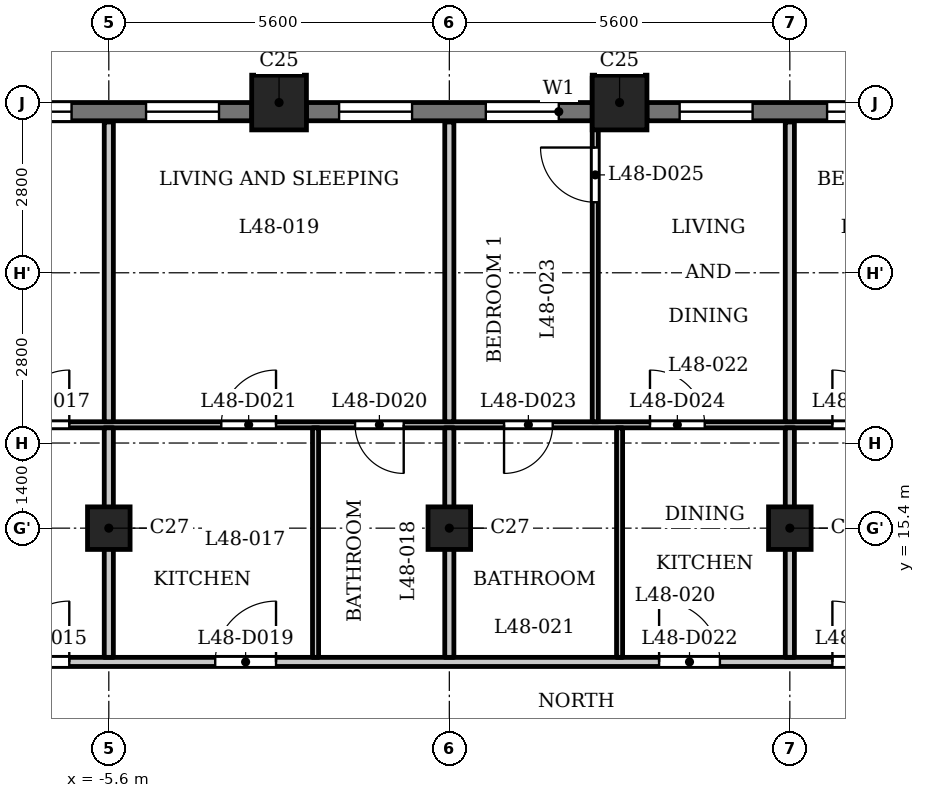
"""IFC4 building model, lengths in metres.
Left out: names, types, materials, properties, quantities, classifications, styles, units other than length and angle.
Written with IfcOpenShell. Run it as: python <this file> out.ifc"""

import sys

from ifc_helpers import new_model, si_unit, direction, frame, frame_2d, origin, origin_2d, place, context, subcontext, project, spatial, rectangle, extrude, element, fill, save


model = new_model("IFC4")
c1 = context("Model", 3, precision=1e-05, world=origin(), true_north=direction((0.0, 1.0)))
c2 = subcontext(c1, "Body", "Model", "MODEL_VIEW")
j1 = project(units=[si_unit("LENGTHUNIT", "METRE"), si_unit("PLANEANGLEUNIT", "RADIAN")], contexts=[c1])
p1 = place(None, origin())
s1 = spatial("IfcSite", under=j1, at=p1, CompositionType="ELEMENT")
p2 = place(p1, origin())
s2 = spatial("IfcBuilding", under=s1, at=p2, CompositionType="ELEMENT")
p3 = place(p2, frame((0.0, 0.0, 188.9)))
s3 = spatial("IfcBuildingStorey", under=s2, at=p3, CompositionType="ELEMENT", Elevation=188.9)
for number, where, z_axis, x_axis in (
    (1, (2.8, 22.4, 0.0), (0.0, 0.0, 1.0), (1.0, 0.0, 0.0)),
    (2, (-2.8, 22.4, 0.0), (0.0, 0.0, 1.0), (1.0, 0.0, 0.0)),
):
    element("IfcColumn", number, at=place(p3, frame(where, z_axis=z_axis, x_axis=x_axis)), inside=s3, PredefinedType="COLUMN", context=c2, shape_type="SweptSolid", body=[
        extrude(rectangle(XDim=0.9, YDim=0.9, at=origin_2d()), origin(), (0.0, 0.0, 1.0), 3.5),
    ])
for number, where, z_axis, x_axis in (
    (3, (-5.6, 15.4, 0.0), (0.0, 0.0, 1.0), (1.0, 0.0, 0.0)),
    (4, (0.0, 15.4, 0.0), (0.0, 0.0, 1.0), (1.0, 0.0, 0.0)),
    (5, (5.6, 15.4, 0.0), (0.0, 0.0, 1.0), (1.0, 0.0, 0.0)),
):
    element("IfcColumn", number, at=place(p3, frame(where, z_axis=z_axis, x_axis=x_axis)), inside=s3, PredefinedType="COLUMN", context=c2, shape_type="SweptSolid", body=[
        extrude(rectangle(XDim=0.7, YDim=0.7, at=origin_2d()), origin(), (0.0, 0.0, 1.0), 3.5),
    ])
p4 = place(p3, frame((7.95, 22.25, 0.0), z_axis=(0.0, 0.0, 1.0), x_axis=(-1.0, 0.0, 0.0)))
e6 = element("IfcWall", 6, at=p4, inside=s3, PredefinedType="SOLIDWALL", context=c2, shape_type="SweptSolid", body=[
    extrude(rectangle(XDim=4.7, YDim=0.3, at=frame_2d((2.35, 0.0))), origin(), (0.0, 0.0, 1.0), 2.5),
])
p5 = place(p4, frame((0.538, 0.0, 0.6)))
e7 = element("IfcOpeningElement", 7, at=p5, cuts=e6, PredefinedType="OPENING", context=c2, shape_type="SweptSolid", body=[
    extrude(rectangle(XDim=1.2, YDim=1.55, at=frame_2d((0.6, 0.775))), frame((0.0, 0.16, 0.0), z_axis=(0.0, -1.0, 0.0), x_axis=(1.0, 0.0, 0.0)), (0.0, 0.0, 1.0), 0.32),
])
p6 = place(p4, frame((2.962, 0.0, 0.6)))
e8 = element("IfcOpeningElement", 8, at=p6, cuts=e6, PredefinedType="OPENING", context=c2, shape_type="SweptSolid", body=[
    extrude(rectangle(XDim=1.2, YDim=1.55, at=frame_2d((0.6, 0.775))), frame((0.0, 0.16, 0.0), z_axis=(0.0, -1.0, 0.0), x_axis=(1.0, 0.0, 0.0)), (0.0, 0.0, 1.0), 0.32),
])
p7 = place(p3, frame((2.35, 22.25, 0.0), z_axis=(0.0, 0.0, 1.0), x_axis=(-1.0, 0.0, 0.0)))
e9 = element("IfcWall", 9, at=p7, inside=s3, PredefinedType="SOLIDWALL", context=c2, shape_type="SweptSolid", body=[
    extrude(rectangle(XDim=4.7, YDim=0.3, at=frame_2d((2.35, 0.0))), origin(), (0.0, 0.0, 1.0), 2.5),
])
p8 = place(p7, frame((0.55, 0.0, 0.6)))
e10 = element("IfcOpeningElement", 10, at=p8, cuts=e9, PredefinedType="OPENING", context=c2, shape_type="SweptSolid", body=[
    extrude(rectangle(XDim=1.2, YDim=1.55, at=frame_2d((0.6, 0.775))), frame((0.0, 0.16, 0.0), z_axis=(0.0, -1.0, 0.0), x_axis=(1.0, 0.0, 0.0)), (0.0, 0.0, 1.0), 0.32),
])
p9 = place(p7, frame((2.962, 0.0, 0.6)))
e11 = element("IfcOpeningElement", 11, at=p9, cuts=e9, PredefinedType="OPENING", context=c2, shape_type="SweptSolid", body=[
    extrude(rectangle(XDim=1.2, YDim=1.55, at=frame_2d((0.6, 0.775))), frame((0.0, 0.16, 0.0), z_axis=(0.0, -1.0, 0.0), x_axis=(1.0, 0.0, 0.0)), (0.0, 0.0, 1.0), 0.32),
])
p10 = place(p3, frame((-3.25, 22.25, 0.0), z_axis=(0.0, 0.0, 1.0), x_axis=(-1.0, 0.0, 0.0)))
e12 = element("IfcWall", 12, at=p10, inside=s3, PredefinedType="SOLIDWALL", context=c2, shape_type="SweptSolid", body=[
    extrude(rectangle(XDim=4.7, YDim=0.3, at=frame_2d((2.35, 0.0))), origin(), (0.0, 0.0, 1.0), 2.5),
])
p11 = place(p10, frame((0.538, 0.0, 0.6)))
e13 = element("IfcOpeningElement", 13, at=p11, cuts=e12, PredefinedType="OPENING", context=c2, shape_type="SweptSolid", body=[
    extrude(rectangle(XDim=1.2, YDim=1.55, at=frame_2d((0.6, 0.775))), frame((0.0, 0.16, 0.0), z_axis=(0.0, -1.0, 0.0), x_axis=(1.0, 0.0, 0.0)), (0.0, 0.0, 1.0), 0.32),
])
p12 = place(p10, frame((2.962, 0.0, 0.6)))
e14 = element("IfcOpeningElement", 14, at=p12, cuts=e12, PredefinedType="OPENING", context=c2, shape_type="SweptSolid", body=[
    extrude(rectangle(XDim=1.2, YDim=1.55, at=frame_2d((0.6, 0.775))), frame((0.0, 0.16, 0.0), z_axis=(0.0, -1.0, 0.0), x_axis=(1.0, 0.0, 0.0)), (0.0, 0.0, 1.0), 0.32),
])
p13 = place(p3, frame((-17.4, 13.2, 0.0), z_axis=(0.0, 0.0, 1.0), x_axis=(1.0, 0.0, 0.0)))
e15 = element("IfcWall", 15, at=p13, inside=s3, PredefinedType="PARTITIONING", context=c2, shape_type="SweptSolid", body=[
    extrude(rectangle(XDim=34.8, YDim=0.15, at=frame_2d((17.4, 0.0))), origin(), (0.0, 0.0, 1.0), 3.2),
])
p14 = place(p13, frame((0.25, 0.0, 0.0)))
e16 = element("IfcOpeningElement", 16, at=p14, cuts=e15, PredefinedType="OPENING", context=c2, shape_type="SweptSolid", body=[
    extrude(rectangle(XDim=1.0, YDim=2.1, at=frame_2d((0.5, 1.05))), frame((0.0, 0.085, 0.0), z_axis=(0.0, -1.0, 0.0), x_axis=(1.0, 0.0, 0.0)), (0.0, 0.0, 1.0), 0.17),
])
p15 = place(p13, frame((33.65, 0.0, 0.0)))
e17 = element("IfcOpeningElement", 17, at=p15, cuts=e15, PredefinedType="OPENING", context=c2, shape_type="SweptSolid", body=[
    extrude(rectangle(XDim=1.0, YDim=2.1, at=frame_2d((0.5, 1.05))), frame((0.0, 0.085, 0.0), z_axis=(0.0, -1.0, 0.0), x_axis=(1.0, 0.0, 0.0)), (0.0, 0.0, 1.0), 0.17),
])
p16 = place(p13, frame((10.15, 0.0, 0.0)))
e18 = element("IfcOpeningElement", 18, at=p16, cuts=e15, PredefinedType="OPENING", context=c2, shape_type="SweptSolid", body=[
    extrude(rectangle(XDim=1.0, YDim=2.1, at=frame_2d((0.5, 1.05))), frame((0.0, 0.085, 0.0), z_axis=(0.0, -1.0, 0.0), x_axis=(1.0, 0.0, 0.0)), (0.0, 0.0, 1.0), 0.17),
])
p17 = place(p13, frame((13.55, 0.0, 0.0)))
e19 = element("IfcOpeningElement", 19, at=p17, cuts=e15, PredefinedType="OPENING", context=c2, shape_type="SweptSolid", body=[
    extrude(rectangle(XDim=1.0, YDim=2.1, at=frame_2d((0.5, 1.05))), frame((0.0, 0.085, 0.0), z_axis=(0.0, -1.0, 0.0), x_axis=(1.0, 0.0, 0.0)), (0.0, 0.0, 1.0), 0.17),
])
p18 = place(p13, frame((20.85, 0.0, 0.0)))
e20 = element("IfcOpeningElement", 20, at=p18, cuts=e15, PredefinedType="OPENING", context=c2, shape_type="SweptSolid", body=[
    extrude(rectangle(XDim=1.0, YDim=2.1, at=frame_2d((0.5, 1.05))), frame((0.0, 0.085, 0.0), z_axis=(0.0, -1.0, 0.0), x_axis=(1.0, 0.0, 0.0)), (0.0, 0.0, 1.0), 0.17),
])
p19 = place(p13, frame((23.7, 0.0, 0.0)))
e21 = element("IfcOpeningElement", 21, at=p19, cuts=e15, PredefinedType="OPENING", context=c2, shape_type="SweptSolid", body=[
    extrude(rectangle(XDim=1.0, YDim=2.1, at=frame_2d((0.5, 1.05))), frame((0.0, 0.085, 0.0), z_axis=(0.0, -1.0, 0.0), x_axis=(1.0, 0.0, 0.0)), (0.0, 0.0, 1.0), 0.17),
])
p20 = place(p3, frame((-16.725, 17.1, 0.0), z_axis=(0.0, 0.0, 1.0), x_axis=(1.0, 0.0, 0.0)))
e22 = element("IfcWall", 22, at=p20, inside=s3, PredefinedType="PARTITIONING", context=c2, shape_type="SweptSolid", body=[
    extrude(rectangle(XDim=33.45, YDim=0.1, at=frame_2d((16.725, 0.0))), origin(), (0.0, 0.0, 1.0), 3.2),
])
p21 = place(p20, frame((4.075, 0.0, 0.0)))
e23 = element("IfcOpeningElement", 23, at=p21, cuts=e22, PredefinedType="OPENING", context=c2, shape_type="SweptSolid", body=[
    extrude(rectangle(XDim=0.8, YDim=2.1, at=frame_2d((0.4, 1.05))), frame((0.0, 0.06, 0.0), z_axis=(0.0, -1.0, 0.0), x_axis=(1.0, 0.0, 0.0)), (0.0, 0.0, 1.0), 0.12),
])
p22 = place(p20, frame((9.575, 0.0, 0.0)))
e24 = element("IfcOpeningElement", 24, at=p22, cuts=e22, PredefinedType="OPENING", context=c2, shape_type="SweptSolid", body=[
    extrude(rectangle(XDim=0.9, YDim=2.1, at=frame_2d((0.45, 1.05))), frame((0.0, 0.06, 0.0), z_axis=(0.0, -1.0, 0.0), x_axis=(1.0, 0.0, 0.0)), (0.0, 0.0, 1.0), 0.12),
])
p23 = place(p20, frame((15.175, 0.0, 0.0)))
e25 = element("IfcOpeningElement", 25, at=p23, cuts=e22, PredefinedType="OPENING", context=c2, shape_type="SweptSolid", body=[
    extrude(rectangle(XDim=0.8, YDim=2.1, at=frame_2d((0.4, 1.05))), frame((0.0, 0.06, 0.0), z_axis=(0.0, -1.0, 0.0), x_axis=(1.0, 0.0, 0.0)), (0.0, 0.0, 1.0), 0.12),
])
p24 = place(p20, frame((12.975, 0.0, 0.0)))
e26 = element("IfcOpeningElement", 26, at=p24, cuts=e22, PredefinedType="OPENING", context=c2, shape_type="SweptSolid", body=[
    extrude(rectangle(XDim=0.9, YDim=2.1, at=frame_2d((0.45, 1.05))), frame((0.0, 0.06, 0.0), z_axis=(0.0, -1.0, 0.0), x_axis=(1.0, 0.0, 0.0)), (0.0, 0.0, 1.0), 0.12),
])
p25 = place(p20, frame((17.625, 0.0, 0.0)))
e27 = element("IfcOpeningElement", 27, at=p25, cuts=e22, PredefinedType="OPENING", context=c2, shape_type="SweptSolid", body=[
    extrude(rectangle(XDim=0.8, YDim=2.1, at=frame_2d((0.4, 1.05))), frame((0.0, 0.06, 0.0), z_axis=(0.0, -1.0, 0.0), x_axis=(1.0, 0.0, 0.0)), (0.0, 0.0, 1.0), 0.12),
])
p26 = place(p20, frame((20.025, 0.0, 0.0)))
e28 = element("IfcOpeningElement", 28, at=p26, cuts=e22, PredefinedType="OPENING", context=c2, shape_type="SweptSolid", body=[
    extrude(rectangle(XDim=0.9, YDim=2.1, at=frame_2d((0.45, 1.05))), frame((0.0, 0.06, 0.0), z_axis=(0.0, -1.0, 0.0), x_axis=(1.0, 0.0, 0.0)), (0.0, 0.0, 1.0), 0.12),
])
p27 = place(p20, frame((31.975, 0.0, 0.0)))
e29 = element("IfcOpeningElement", 29, at=p27, cuts=e22, PredefinedType="OPENING", context=c2, shape_type="SweptSolid", body=[
    extrude(rectangle(XDim=0.8, YDim=2.1, at=frame_2d((0.4, 1.05))), frame((0.0, 0.06, 0.0), z_axis=(0.0, -1.0, 0.0), x_axis=(1.0, 0.0, 0.0)), (0.0, 0.0, 1.0), 0.12),
])
p28 = place(p20, frame((29.775, 0.0, 0.0)))
e30 = element("IfcOpeningElement", 30, at=p28, cuts=e22, PredefinedType="OPENING", context=c2, shape_type="SweptSolid", body=[
    extrude(rectangle(XDim=0.9, YDim=2.1, at=frame_2d((0.45, 1.05))), frame((0.0, 0.06, 0.0), z_axis=(0.0, -1.0, 0.0), x_axis=(1.0, 0.0, 0.0)), (0.0, 0.0, 1.0), 0.12),
])
p29 = place(p20, frame((23.025, 0.0, 0.0)))
e31 = element("IfcOpeningElement", 31, at=p29, cuts=e22, PredefinedType="OPENING", context=c2, shape_type="SweptSolid", body=[
    extrude(rectangle(XDim=0.9, YDim=2.1, at=frame_2d((0.45, 1.05))), frame((0.0, 0.06, 0.0), z_axis=(0.0, -1.0, 0.0), x_axis=(1.0, 0.0, 0.0)), (0.0, 0.0, 1.0), 0.12),
])
p30 = place(p20, frame((26.125, 0.0, 0.0)))
e32 = element("IfcOpeningElement", 32, at=p30, cuts=e22, PredefinedType="OPENING", context=c2, shape_type="SweptSolid", body=[
    extrude(rectangle(XDim=0.9, YDim=2.1, at=frame_2d((0.45, 1.05))), frame((0.0, 0.06, 0.0), z_axis=(0.0, -1.0, 0.0), x_axis=(1.0, 0.0, 0.0)), (0.0, 0.0, 1.0), 0.12),
])
p31 = place(p3, frame((-5.6, 13.275, 0.0), z_axis=(0.0, 0.0, 1.0), x_axis=(0.0, 1.0, 0.0)))
e33 = element("IfcWall", 33, at=p31, inside=s3, PredefinedType="PARTITIONING", context=c2, shape_type="SweptSolid", body=[
    extrude(rectangle(XDim=3.775, YDim=0.15, at=frame_2d((1.888, 0.0))), origin(), (0.0, 0.0, 1.0), 3.2),
])
p32 = place(p3, frame((-5.6, 17.15, 0.0), z_axis=(0.0, 0.0, 1.0), x_axis=(0.0, 1.0, 0.0)))
e34 = element("IfcWall", 34, at=p32, inside=s3, PredefinedType="PARTITIONING", context=c2, shape_type="SweptSolid", body=[
    extrude(rectangle(XDim=4.93, YDim=0.15, at=frame_2d((2.465, 0.0))), origin(), (0.0, 0.0, 1.0), 3.2),
])
p33 = place(p3, frame((-2.2, 13.275, 0.0), z_axis=(0.0, 0.0, 1.0), x_axis=(0.0, 1.0, 0.0)))
e35 = element("IfcWall", 35, at=p33, inside=s3, PredefinedType="PARTITIONING", context=c2, shape_type="SweptSolid", body=[
    extrude(rectangle(XDim=3.775, YDim=0.1, at=frame_2d((1.888, 0.0))), origin(), (0.0, 0.0, 1.0), 3.2),
])
p34 = place(p3, frame((0.0, 13.275, 0.0), z_axis=(0.0, 0.0, 1.0), x_axis=(0.0, 1.0, 0.0)))
e36 = element("IfcWall", 36, at=p34, inside=s3, PredefinedType="PARTITIONING", context=c2, shape_type="SweptSolid", body=[
    extrude(rectangle(XDim=3.775, YDim=0.15, at=frame_2d((1.888, 0.0))), origin(), (0.0, 0.0, 1.0), 3.2),
])
p35 = place(p3, frame((0.0, 17.15, 0.0), z_axis=(0.0, 0.0, 1.0), x_axis=(0.0, 1.0, 0.0)))
e37 = element("IfcWall", 37, at=p35, inside=s3, PredefinedType="PARTITIONING", context=c2, shape_type="SweptSolid", body=[
    extrude(rectangle(XDim=4.93, YDim=0.15, at=frame_2d((2.465, 0.0))), origin(), (0.0, 0.0, 1.0), 3.2),
])
p36 = place(p3, frame((2.4, 17.15, 0.0), z_axis=(0.0, 0.0, 1.0), x_axis=(0.0, 1.0, 0.0)))
e38 = element("IfcWall", 38, at=p36, inside=s3, PredefinedType="PARTITIONING", context=c2, shape_type="SweptSolid", body=[
    extrude(rectangle(XDim=5.68, YDim=0.1, at=frame_2d((2.84, 0.0))), origin(), (0.0, 0.0, 1.0), 3.2),
])
p37 = place(p36, frame((3.61, 0.0, 0.0)))
e39 = element("IfcOpeningElement", 39, at=p37, cuts=e38, PredefinedType="OPENING", context=c2, shape_type="SweptSolid", body=[
    extrude(rectangle(XDim=0.9, YDim=2.1, at=frame_2d((0.45, 1.05))), frame((0.0, 0.06, 0.0), z_axis=(0.0, -1.0, 0.0), x_axis=(1.0, 0.0, 0.0)), (0.0, 0.0, 1.0), 0.12),
])
p38 = place(p3, frame((2.8, 13.275, 0.0), z_axis=(0.0, 0.0, 1.0), x_axis=(0.0, 1.0, 0.0)))
e40 = element("IfcWall", 40, at=p38, inside=s3, PredefinedType="PARTITIONING", context=c2, shape_type="SweptSolid", body=[
    extrude(rectangle(XDim=3.775, YDim=0.1, at=frame_2d((1.888, 0.0))), origin(), (0.0, 0.0, 1.0), 3.2),
])
p39 = place(p3, frame((5.6, 13.275, 0.0), z_axis=(0.0, 0.0, 1.0), x_axis=(0.0, 1.0, 0.0)))
e41 = element("IfcWall", 41, at=p39, inside=s3, PredefinedType="PARTITIONING", context=c2, shape_type="SweptSolid", body=[
    extrude(rectangle(XDim=3.775, YDim=0.15, at=frame_2d((1.888, 0.0))), origin(), (0.0, 0.0, 1.0), 3.2),
])
p40 = place(p3, frame((5.6, 17.15, 0.0), z_axis=(0.0, 0.0, 1.0), x_axis=(0.0, 1.0, 0.0)))
e42 = element("IfcWall", 42, at=p40, inside=s3, PredefinedType="PARTITIONING", context=c2, shape_type="SweptSolid", body=[
    extrude(rectangle(XDim=4.93, YDim=0.15, at=frame_2d((2.465, 0.0))), origin(), (0.0, 0.0, 1.0), 3.2),
])
p41 = place(p16, origin())
e43 = element("IfcDoor", 43, at=p41, inside=s3, OperationType="SINGLE_SWING_LEFT", PredefinedType="DOOR", context=c2, shape_type="SweptSolid", body=[
    extrude(rectangle(XDim=1.0, YDim=2.1, at=frame_2d((0.5, 1.05))), frame((0.0, 0.025, 0.0), z_axis=(0.0, -1.0, 0.0), x_axis=(1.0, 0.0, 0.0)), (0.0, 0.0, 1.0), 0.05),
])
fill(e18, e43)
p42 = place(p22, origin())
e44 = element("IfcDoor", 44, at=p42, inside=s3, OperationType="SINGLE_SWING_LEFT", PredefinedType="DOOR", context=c2, shape_type="SweptSolid", body=[
    extrude(rectangle(XDim=0.9, YDim=2.1, at=frame_2d((0.45, 1.05))), frame((0.0, 0.025, 0.0), z_axis=(0.0, -1.0, 0.0), x_axis=(1.0, 0.0, 0.0)), (0.0, 0.0, 1.0), 0.05),
])
fill(e24, e44)
p43 = place(p17, origin())
e45 = element("IfcDoor", 45, at=p43, inside=s3, OperationType="SINGLE_SWING_LEFT", PredefinedType="DOOR", context=c2, shape_type="SweptSolid", body=[
    extrude(rectangle(XDim=1.0, YDim=2.1, at=frame_2d((0.5, 1.05))), frame((0.0, 0.025, 0.0), z_axis=(0.0, -1.0, 0.0), x_axis=(1.0, 0.0, 0.0)), (0.0, 0.0, 1.0), 0.05),
])
fill(e19, e45)
p44 = place(p23, origin())
e46 = element("IfcDoor", 46, at=p44, inside=s3, OperationType="SINGLE_SWING_RIGHT", PredefinedType="DOOR", context=c2, shape_type="SweptSolid", body=[
    extrude(rectangle(XDim=0.8, YDim=2.1, at=frame_2d((0.4, 1.05))), frame((0.0, 0.025, 0.0), z_axis=(0.0, -1.0, 0.0), x_axis=(1.0, 0.0, 0.0)), (0.0, 0.0, 1.0), 0.05),
])
fill(e25, e46)
p45 = place(p24, origin())
e47 = element("IfcDoor", 47, at=p45, inside=s3, OperationType="SINGLE_SWING_LEFT", PredefinedType="DOOR", context=c2, shape_type="SweptSolid", body=[
    extrude(rectangle(XDim=0.9, YDim=2.1, at=frame_2d((0.45, 1.05))), frame((0.0, 0.025, 0.0), z_axis=(0.0, -1.0, 0.0), x_axis=(1.0, 0.0, 0.0)), (0.0, 0.0, 1.0), 0.05),
])
fill(e26, e47)
p46 = place(p18, origin())
e48 = element("IfcDoor", 48, at=p46, inside=s3, OperationType="SINGLE_SWING_RIGHT", PredefinedType="DOOR", context=c2, shape_type="SweptSolid", body=[
    extrude(rectangle(XDim=1.0, YDim=2.1, at=frame_2d((0.5, 1.05))), frame((0.0, 0.025, 0.0), z_axis=(0.0, -1.0, 0.0), x_axis=(1.0, 0.0, 0.0)), (0.0, 0.0, 1.0), 0.05),
])
fill(e20, e48)
p47 = place(p25, origin())
e49 = element("IfcDoor", 49, at=p47, inside=s3, OperationType="SINGLE_SWING_LEFT", PredefinedType="DOOR", context=c2, shape_type="SweptSolid", body=[
    extrude(rectangle(XDim=0.8, YDim=2.1, at=frame_2d((0.4, 1.05))), frame((0.0, 0.025, 0.0), z_axis=(0.0, -1.0, 0.0), x_axis=(1.0, 0.0, 0.0)), (0.0, 0.0, 1.0), 0.05),
])
fill(e27, e49)
p48 = place(p26, origin())
e50 = element("IfcDoor", 50, at=p48, inside=s3, OperationType="SINGLE_SWING_RIGHT", PredefinedType="DOOR", context=c2, shape_type="SweptSolid", body=[
    extrude(rectangle(XDim=0.9, YDim=2.1, at=frame_2d((0.45, 1.05))), frame((0.0, 0.025, 0.0), z_axis=(0.0, -1.0, 0.0), x_axis=(1.0, 0.0, 0.0)), (0.0, 0.0, 1.0), 0.05),
])
fill(e28, e50)
p49 = place(p37, origin())
e51 = element("IfcDoor", 51, at=p49, inside=s3, OperationType="SINGLE_SWING_LEFT", PredefinedType="DOOR", context=c2, shape_type="SweptSolid", body=[
    extrude(rectangle(XDim=0.9, YDim=2.1, at=frame_2d((0.45, 1.05))), frame((0.0, 0.025, 0.0), z_axis=(0.0, -1.0, 0.0), x_axis=(1.0, 0.0, 0.0)), (0.0, 0.0, 1.0), 0.05),
])
fill(e39, e51)
p50 = place(p19, origin())
e52 = element("IfcDoor", 52, at=p50, inside=s3, OperationType="SINGLE_SWING_RIGHT", PredefinedType="DOOR", context=c2, shape_type="SweptSolid", body=[
    extrude(rectangle(XDim=1.0, YDim=2.1, at=frame_2d((0.5, 1.05))), frame((0.0, 0.025, 0.0), z_axis=(0.0, -1.0, 0.0), x_axis=(1.0, 0.0, 0.0)), (0.0, 0.0, 1.0), 0.05),
])
fill(e21, e52)
p51 = place(p29, origin())
e53 = element("IfcDoor", 53, at=p51, inside=s3, OperationType="SINGLE_SWING_RIGHT", PredefinedType="DOOR", context=c2, shape_type="SweptSolid", body=[
    extrude(rectangle(XDim=0.9, YDim=2.1, at=frame_2d((0.45, 1.05))), frame((0.0, 0.025, 0.0), z_axis=(0.0, -1.0, 0.0), x_axis=(1.0, 0.0, 0.0)), (0.0, 0.0, 1.0), 0.05),
])
fill(e31, e53)
p52 = place(p5, origin())
e54 = element("IfcWindow", 54, at=p52, inside=s3, PartitioningType="SINGLE_PANEL", PredefinedType="WINDOW", context=c2, shape_type="SweptSolid", body=[
    extrude(rectangle(XDim=1.2, YDim=1.55, at=frame_2d((0.6, 0.775))), frame((0.0, 0.03, 0.0), z_axis=(0.0, -1.0, 0.0), x_axis=(1.0, 0.0, 0.0)), (0.0, 0.0, 1.0), 0.06),
])
fill(e7, e54)
p53 = place(p6, origin())
e55 = element("IfcWindow", 55, at=p53, inside=s3, PartitioningType="SINGLE_PANEL", PredefinedType="WINDOW", context=c2, shape_type="SweptSolid", body=[
    extrude(rectangle(XDim=1.2, YDim=1.55, at=frame_2d((0.6, 0.775))), frame((0.0, 0.03, 0.0), z_axis=(0.0, -1.0, 0.0), x_axis=(1.0, 0.0, 0.0)), (0.0, 0.0, 1.0), 0.06),
])
fill(e8, e55)
p54 = place(p8, origin())
e56 = element("IfcWindow", 56, at=p54, inside=s3, PartitioningType="SINGLE_PANEL", PredefinedType="WINDOW", context=c2, shape_type="SweptSolid", body=[
    extrude(rectangle(XDim=1.2, YDim=1.55, at=frame_2d((0.6, 0.775))), frame((0.0, 0.03, 0.0), z_axis=(0.0, -1.0, 0.0), x_axis=(1.0, 0.0, 0.0)), (0.0, 0.0, 1.0), 0.06),
])
fill(e10, e56)
p55 = place(p9, origin())
e57 = element("IfcWindow", 57, at=p55, inside=s3, PartitioningType="SINGLE_PANEL", PredefinedType="WINDOW", context=c2, shape_type="SweptSolid", body=[
    extrude(rectangle(XDim=1.2, YDim=1.55, at=frame_2d((0.6, 0.775))), frame((0.0, 0.03, 0.0), z_axis=(0.0, -1.0, 0.0), x_axis=(1.0, 0.0, 0.0)), (0.0, 0.0, 1.0), 0.06),
])
fill(e11, e57)
p56 = place(p11, origin())
e58 = element("IfcWindow", 58, at=p56, inside=s3, PartitioningType="SINGLE_PANEL", PredefinedType="WINDOW", context=c2, shape_type="SweptSolid", body=[
    extrude(rectangle(XDim=1.2, YDim=1.55, at=frame_2d((0.6, 0.775))), frame((0.0, 0.03, 0.0), z_axis=(0.0, -1.0, 0.0), x_axis=(1.0, 0.0, 0.0)), (0.0, 0.0, 1.0), 0.06),
])
fill(e13, e58)
p57 = place(p12, origin())
e59 = element("IfcWindow", 59, at=p57, inside=s3, PartitioningType="SINGLE_PANEL", PredefinedType="WINDOW", context=c2, shape_type="SweptSolid", body=[
    extrude(rectangle(XDim=1.2, YDim=1.55, at=frame_2d((0.6, 0.775))), frame((0.0, 0.03, 0.0), z_axis=(0.0, -1.0, 0.0), x_axis=(1.0, 0.0, 0.0)), (0.0, 0.0, 1.0), 0.06),
])
fill(e14, e59)
save(model, sys.argv[1])
